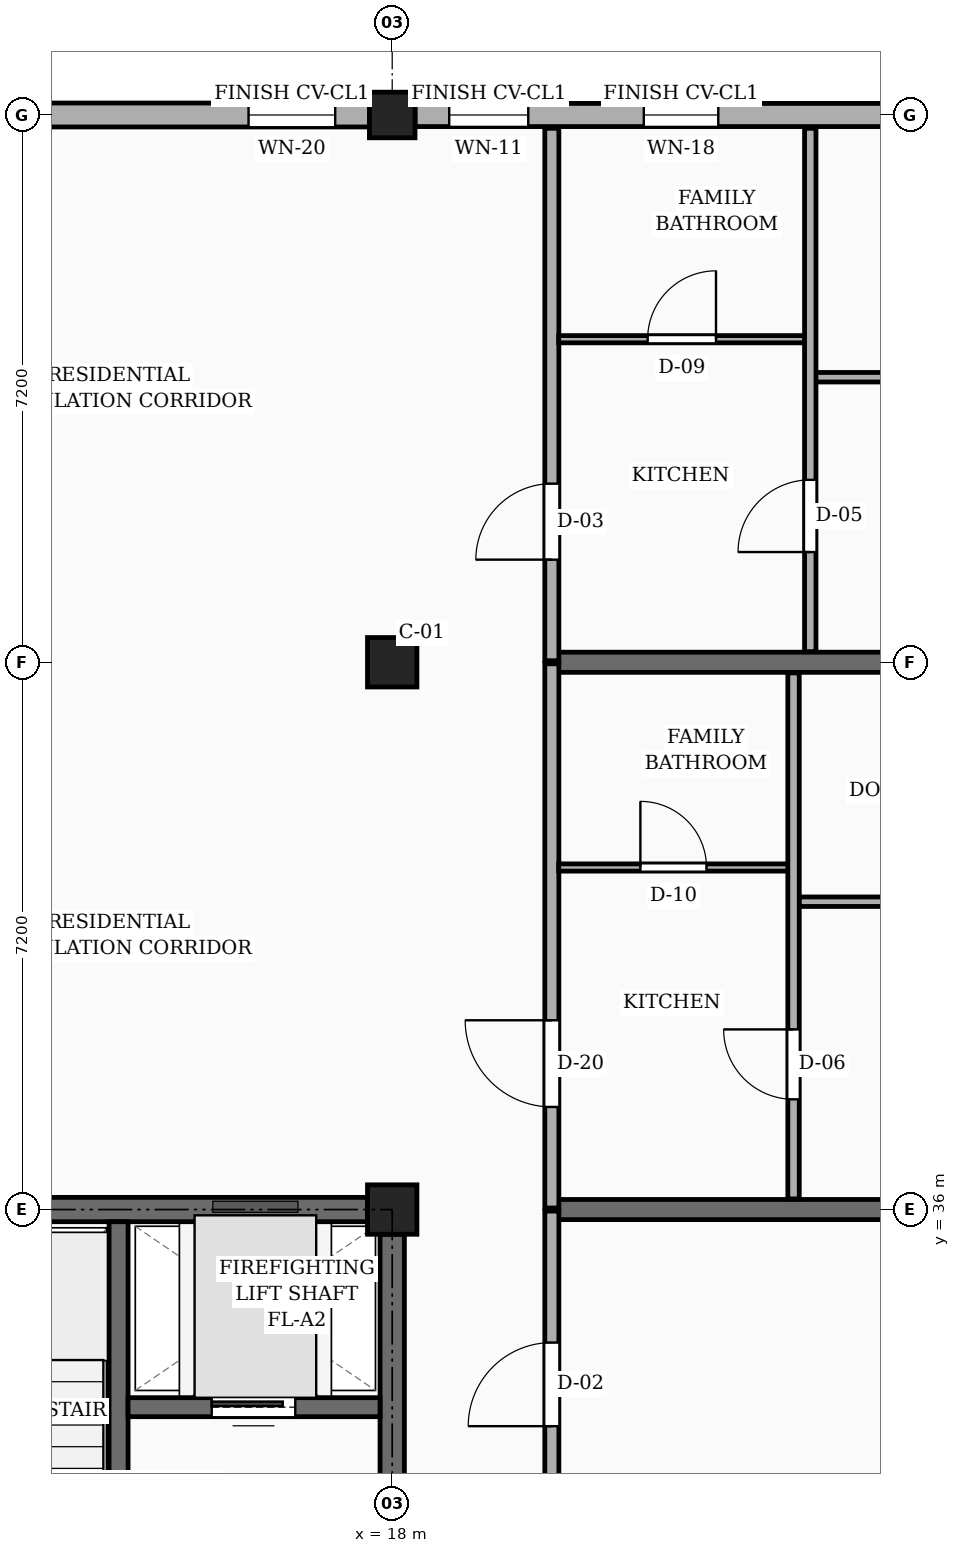
"""IFC4 building model, lengths in metres.
Left out: names, types, materials, properties, quantities, classifications, styles, units other than length and angle.
Written with IfcOpenShell. Run it as: python <this file> out.ifc"""

import sys

from ifc_helpers import new_model, si_unit, direction, frame, frame_2d, origin, origin_2d, place, context, subcontext, project, spatial, rectangle, extrude, element, fill, save


model = new_model("IFC4")
c1 = context("Model", 3, precision=1e-05, world=origin(), true_north=direction((0.0, 1.0)))
c2 = subcontext(c1, "Body", "Model", "MODEL_VIEW")
j1 = project(units=[si_unit("LENGTHUNIT", "METRE"), si_unit("PLANEANGLEUNIT", "RADIAN")], contexts=[c1])
p1 = place(None, origin())
s1 = spatial("IfcSite", under=j1, at=p1, CompositionType="ELEMENT")
p2 = place(p1, origin())
s2 = spatial("IfcBuilding", under=s1, at=p2, CompositionType="ELEMENT")
p3 = place(p2, origin())
s3 = spatial("IfcBuildingStorey", under=s2, at=p3, CompositionType="ELEMENT", Elevation=0.0)
for number, where, z_axis, x_axis in (
    (1, (18.0, 36.0, 0.0), (0.0, 0.0, 1.0), (1.0, 0.0, 0.0)),
    (2, (18.0, 43.2, 0.0), (0.0, 0.0, 1.0), (1.0, 0.0, 0.0)),
):
    element("IfcColumn", number, at=place(p3, frame(where, z_axis=z_axis, x_axis=x_axis)), inside=s3, PredefinedType="COLUMN", context=c2, shape_type="SweptSolid", body=[
        extrude(rectangle(XDim=0.65, YDim=0.65, at=origin_2d()), origin(), (0.0, 0.0, 1.0), 4.5),
    ])
p4 = place(p3, frame((18.0, 50.4, 0.0), z_axis=(0.0, 0.0, 1.0), x_axis=(1.0, 0.0, 0.0)))
e3 = element("IfcColumn", 3, at=p4, inside=s3, PredefinedType="COLUMN", context=c2, shape_type="SweptSolid", body=[
    extrude(rectangle(XDim=0.6, YDim=0.6, at=origin_2d()), origin(), (0.0, 0.0, 1.0), 4.5),
])
for number, where, z_axis, x_axis in (
    (4, (20.1, 36.0, 0.0), (0.0, 0.0, 1.0), (1.0, 0.0, 0.0)),
    (5, (20.1, 43.2, 0.0), (0.0, 0.0, 1.0), (1.0, 0.0, 0.0)),
):
    element("IfcWall", number, at=place(p3, frame(where, z_axis=z_axis, x_axis=x_axis)), inside=s3, PredefinedType="SOLIDWALL", context=c2, shape_type="SweptSolid", body=[
        extrude(rectangle(XDim=12.0, YDim=0.265, at=frame_2d((6.0, 0.0))), origin(), (0.0, 0.0, 1.0), 3.52),
    ])
p5 = place(p3, frame((24.9, 50.4, 0.0), z_axis=(0.0, 0.0, 1.0), x_axis=(-1.0, 0.0, 0.0)))
e6 = element("IfcWall", 6, at=p5, inside=s3, PredefinedType="SOLIDWALL", context=c2, shape_type="SweptSolid", body=[
    extrude(rectangle(XDim=6.6, YDim=0.305, at=frame_2d((3.3, 0.0))), origin(), (0.0, 0.0, 1.0), 3.79),
])
p6 = place(p5, frame((2.61, 0.0, 0.78)))
e7 = element("IfcOpeningElement", 7, at=p6, cuts=e6, PredefinedType="OPENING", context=c2, shape_type="SweptSolid", body=[
    extrude(rectangle(XDim=0.98, YDim=1.36, at=frame_2d((0.49, 0.68))), frame((0.0, 0.163, 0.0), z_axis=(0.0, -1.0, 0.0), x_axis=(1.0, 0.0, 0.0)), (0.0, 0.0, 1.0), 0.325),
])
p7 = place(p5, frame((5.11, 0.0, 0.78)))
e8 = element("IfcOpeningElement", 8, at=p7, cuts=e6, PredefinedType="OPENING", context=c2, shape_type="SweptSolid", body=[
    extrude(rectangle(XDim=1.04, YDim=1.26, at=frame_2d((0.52, 0.63))), frame((0.0, 0.163, 0.0), z_axis=(0.0, -1.0, 0.0), x_axis=(1.0, 0.0, 0.0)), (0.0, 0.0, 1.0), 0.325),
])
p8 = place(p3, frame((17.7, 50.4, 0.0), z_axis=(0.0, 0.0, 1.0), x_axis=(-1.0, 0.0, 0.0)))
e9 = element("IfcWall", 9, at=p8, inside=s3, PredefinedType="SOLIDWALL", context=c2, shape_type="SweptSolid", body=[
    extrude(rectangle(XDim=6.6, YDim=0.315, at=frame_2d((3.3, 0.0))), origin(), (0.0, 0.0, 1.0), 3.79),
])
p9 = place(p8, frame((0.45, 0.0, 0.78)))
e10 = element("IfcOpeningElement", 10, at=p9, cuts=e9, PredefinedType="OPENING", context=c2, shape_type="SweptSolid", body=[
    extrude(rectangle(XDim=1.14, YDim=1.36, at=frame_2d((0.57, 0.68))), frame((0.0, 0.167, 0.0), z_axis=(0.0, -1.0, 0.0), x_axis=(1.0, 0.0, 0.0)), (0.0, 0.0, 1.0), 0.335),
])
p10 = place(p8, frame((4.65, 0.0, 0.78)))
e11 = element("IfcOpeningElement", 11, at=p10, cuts=e9, PredefinedType="OPENING", context=c2, shape_type="SweptSolid", body=[
    extrude(rectangle(XDim=1.3, YDim=1.36, at=frame_2d((0.65, 0.68))), frame((0.0, 0.167, 0.0), z_axis=(0.0, -1.0, 0.0), x_axis=(1.0, 0.0, 0.0)), (0.0, 0.0, 1.0), 0.335),
])
p11 = place(p3, frame((11.125, 36.0, 0.0), z_axis=(0.0, 0.0, 1.0), x_axis=(1.0, 0.0, 0.0)))
e12 = element("IfcWall", 12, at=p11, inside=s3, PredefinedType="SHEAR", context=c2, shape_type="SweptSolid", body=[
    extrude(rectangle(XDim=6.55, YDim=0.32, at=frame_2d((3.275, 0.0))), origin(), (0.0, 0.0, 1.0), 4.22),
])
p12 = place(p3, frame((18.0, 29.125, 0.0), z_axis=(0.0, 0.0, 1.0), x_axis=(0.0, 1.0, 0.0)))
e13 = element("IfcWall", 13, at=p12, inside=s3, PredefinedType="SHEAR", context=c2, shape_type="SweptSolid", body=[
    extrude(rectangle(XDim=6.55, YDim=0.32, at=frame_2d((3.275, 0.0))), origin(), (0.0, 0.0, 1.0), 4.22),
])
p13 = place(p12, frame((1.5, 0.0, 0.0)))
e14 = element("IfcOpeningElement", 14, at=p13, cuts=e13, PredefinedType="OPENING", context=c2, shape_type="SweptSolid", body=[
    extrude(rectangle(XDim=1.1, YDim=2.15, at=frame_2d((0.55, 1.075))), frame((0.0, 0.17, 0.0), z_axis=(0.0, -1.0, 0.0), x_axis=(1.0, 0.0, 0.0)), (0.0, 0.0, 1.0), 0.34),
])
p14 = place(p3, frame((14.4, 28.96, 0.0), z_axis=(0.0, 0.0, 1.0), x_axis=(0.0, 1.0, 0.0)))
e15 = element("IfcWall", 15, at=p14, inside=s3, PredefinedType="SHEAR", context=c2, shape_type="SweptSolid", body=[
    extrude(rectangle(XDim=6.88, YDim=0.25, at=frame_2d((3.44, 0.0))), origin(), (0.0, 0.0, 1.0), 4.22),
])
p15 = place(p14, frame((0.44, 0.0, 0.0)))
e16 = element("IfcOpeningElement", 16, at=p15, cuts=e15, PredefinedType="OPENING", context=c2, shape_type="SweptSolid", body=[
    extrude(rectangle(XDim=1.05, YDim=2.15, at=frame_2d((0.525, 1.075))), frame((0.0, 0.135, 0.0), z_axis=(0.0, -1.0, 0.0), x_axis=(1.0, 0.0, 0.0)), (0.0, 0.0, 1.0), 0.27),
])
p16 = place(p3, frame((14.525, 33.4, 0.0), z_axis=(0.0, 0.0, 1.0), x_axis=(1.0, 0.0, 0.0)))
e17 = element("IfcWall", 17, at=p16, inside=s3, PredefinedType="SHEAR", context=c2, shape_type="SweptSolid", body=[
    extrude(rectangle(XDim=3.315, YDim=0.25, at=frame_2d((1.658, 0.0))), origin(), (0.0, 0.0, 1.0), 4.22),
])
p17 = place(p16, frame((1.1, 0.0, 0.0)))
e18 = element("IfcOpeningElement", 18, at=p17, cuts=e17, PredefinedType="OPENING", context=c2, shape_type="SweptSolid", body=[
    extrude(rectangle(XDim=1.1, YDim=2.2, at=frame_2d((0.55, 1.1))), frame((0.0, 0.135, 0.0), z_axis=(0.0, -1.0, 0.0), x_axis=(1.0, 0.0, 0.0)), (0.0, 0.0, 1.0), 0.27),
])
p18 = place(p3, frame((20.1, 28.82, 0.0), z_axis=(0.0, 0.0, 1.0), x_axis=(0.0, 1.0, 0.0)))
e19 = element("IfcWall", 19, at=p18, inside=s3, PredefinedType="PARTITIONING", context=c2, shape_type="SweptSolid", body=[
    extrude(rectangle(XDim=7.16, YDim=0.185, at=frame_2d((3.58, 0.0))), origin(), (0.0, 0.0, 1.0), 3.655),
])
p19 = place(p18, frame((4.33, 0.0, 0.0)))
e20 = element("IfcOpeningElement", 20, at=p19, cuts=e19, PredefinedType="OPENING", context=c2, shape_type="SweptSolid", body=[
    extrude(rectangle(XDim=1.1, YDim=2.15, at=frame_2d((0.55, 1.075))), frame((0.0, 0.103, 0.0), z_axis=(0.0, -1.0, 0.0), x_axis=(1.0, 0.0, 0.0)), (0.0, 0.0, 1.0), 0.205),
])
p20 = place(p3, frame((20.1, 36.02, 0.0), z_axis=(0.0, 0.0, 1.0), x_axis=(0.0, 1.0, 0.0)))
e21 = element("IfcWall", 21, at=p20, inside=s3, PredefinedType="PARTITIONING", context=c2, shape_type="SweptSolid", body=[
    extrude(rectangle(XDim=7.16, YDim=0.185, at=frame_2d((3.58, 0.0))), origin(), (0.0, 0.0, 1.0), 3.655),
])
p21 = place(p20, frame((1.33, 0.0, 0.0)))
e22 = element("IfcOpeningElement", 22, at=p21, cuts=e21, PredefinedType="OPENING", context=c2, shape_type="SweptSolid", body=[
    extrude(rectangle(XDim=1.14, YDim=2.18, at=frame_2d((0.57, 1.09))), frame((0.0, 0.103, 0.0), z_axis=(0.0, -1.0, 0.0), x_axis=(1.0, 0.0, 0.0)), (0.0, 0.0, 1.0), 0.205),
])
p22 = place(p3, frame((20.1, 43.22, 0.0), z_axis=(0.0, 0.0, 1.0), x_axis=(0.0, 1.0, 0.0)))
e23 = element("IfcWall", 23, at=p22, inside=s3, PredefinedType="PARTITIONING", context=c2, shape_type="SweptSolid", body=[
    extrude(rectangle(XDim=7.005, YDim=0.185, at=frame_2d((3.502, 0.0))), origin(), (0.0, 0.0, 1.0), 3.655),
])
p23 = place(p22, frame((1.33, 0.0, 0.0)))
e24 = element("IfcOpeningElement", 24, at=p23, cuts=e23, PredefinedType="OPENING", context=c2, shape_type="SweptSolid", body=[
    extrude(rectangle(XDim=1.0, YDim=2.15, at=frame_2d((0.5, 1.075))), frame((0.0, 0.103, 0.0), z_axis=(0.0, -1.0, 0.0), x_axis=(1.0, 0.0, 0.0)), (0.0, 0.0, 1.0), 0.205),
])
p24 = place(p3, frame((23.35, 40.05, 0.0), z_axis=(0.0, 0.0, 1.0), x_axis=(1.0, 0.0, 0.0)))
e25 = element("IfcWall", 25, at=p24, inside=s3, PredefinedType="PARTITIONING", context=c2, shape_type="SweptSolid", body=[
    extrude(rectangle(XDim=8.875, YDim=0.125, at=frame_2d((4.438, 0.0))), origin(), (0.0, 0.0, 1.0), 3.655),
])
p25 = place(p24, frame((3.998, 0.0, 0.0)))
e26 = element("IfcOpeningElement", 26, at=p25, cuts=e25, PredefinedType="OPENING", context=c2, shape_type="SweptSolid", body=[
    extrude(rectangle(XDim=0.88, YDim=2.08, at=frame_2d((0.44, 1.04))), frame((0.0, 0.073, 0.0), z_axis=(0.0, -1.0, 0.0), x_axis=(1.0, 0.0, 0.0)), (0.0, 0.0, 1.0), 0.145),
])
p26 = place(p3, frame((20.19, 40.5, 0.0), z_axis=(0.0, 0.0, 1.0), x_axis=(1.0, 0.0, 0.0)))
e27 = element("IfcWall", 27, at=p26, inside=s3, PredefinedType="PARTITIONING", context=c2, shape_type="SweptSolid", body=[
    extrude(rectangle(XDim=3.02, YDim=0.095, at=frame_2d((1.51, 0.0))), origin(), (0.0, 0.0, 1.0), 3.655),
])
p27 = place(p26, frame((1.075, 0.0, 0.0)))
e28 = element("IfcOpeningElement", 28, at=p27, cuts=e27, PredefinedType="OPENING", context=c2, shape_type="SweptSolid", body=[
    extrude(rectangle(XDim=0.87, YDim=2.05, at=frame_2d((0.435, 1.025))), frame((0.0, 0.058, 0.0), z_axis=(0.0, -1.0, 0.0), x_axis=(1.0, 0.0, 0.0)), (0.0, 0.0, 1.0), 0.115),
])
p28 = place(p3, frame((23.28, 36.14, 0.0), z_axis=(0.0, 0.0, 1.0), x_axis=(0.0, 1.0, 0.0)))
e29 = element("IfcWall", 29, at=p28, inside=s3, PredefinedType="PARTITIONING", context=c2, shape_type="SweptSolid", body=[
    extrude(rectangle(XDim=6.92, YDim=0.15, at=frame_2d((3.46, 0.0))), origin(), (0.0, 0.0, 1.0), 3.655),
])
p29 = place(p28, frame((1.31, 0.0, 0.0)))
e30 = element("IfcOpeningElement", 30, at=p29, cuts=e29, PredefinedType="OPENING", context=c2, shape_type="SweptSolid", body=[
    extrude(rectangle(XDim=0.92, YDim=2.1, at=frame_2d((0.46, 1.05))), frame((0.0, 0.085, 0.0), z_axis=(0.0, -1.0, 0.0), x_axis=(1.0, 0.0, 0.0)), (0.0, 0.0, 1.0), 0.17),
])
p30 = place(p3, frame((23.57, 46.95, 0.0), z_axis=(0.0, 0.0, 1.0), x_axis=(1.0, 0.0, 0.0)))
e31 = element("IfcWall", 31, at=p30, inside=s3, PredefinedType="PARTITIONING", context=c2, shape_type="SweptSolid", body=[
    extrude(rectangle(XDim=8.655, YDim=0.125, at=frame_2d((4.328, 0.0))), origin(), (0.0, 0.0, 1.0), 3.655),
])
p31 = place(p30, frame((3.877, 0.0, 0.0)))
e32 = element("IfcOpeningElement", 32, at=p31, cuts=e31, PredefinedType="OPENING", context=c2, shape_type="SweptSolid", body=[
    extrude(rectangle(XDim=0.9, YDim=2.1, at=frame_2d((0.45, 1.05))), frame((0.0, 0.073, 0.0), z_axis=(0.0, -1.0, 0.0), x_axis=(1.0, 0.0, 0.0)), (0.0, 0.0, 1.0), 0.145),
])
p32 = place(p3, frame((20.19, 47.45, 0.0), z_axis=(0.0, 0.0, 1.0), x_axis=(1.0, 0.0, 0.0)))
e33 = element("IfcWall", 33, at=p32, inside=s3, PredefinedType="PARTITIONING", context=c2, shape_type="SweptSolid", body=[
    extrude(rectangle(XDim=3.24, YDim=0.095, at=frame_2d((1.62, 0.0))), origin(), (0.0, 0.0, 1.0), 3.655),
])
p33 = place(p32, frame((1.17, 0.0, 0.0)))
e34 = element("IfcOpeningElement", 34, at=p33, cuts=e33, PredefinedType="OPENING", context=c2, shape_type="SweptSolid", body=[
    extrude(rectangle(XDim=0.9, YDim=2.05, at=frame_2d((0.45, 1.025))), frame((0.0, 0.058, 0.0), z_axis=(0.0, -1.0, 0.0), x_axis=(1.0, 0.0, 0.0)), (0.0, 0.0, 1.0), 0.115),
])
p34 = place(p3, frame((23.5, 43.34, 0.0), z_axis=(0.0, 0.0, 1.0), x_axis=(0.0, 1.0, 0.0)))
e35 = element("IfcWall", 35, at=p34, inside=s3, PredefinedType="PARTITIONING", context=c2, shape_type="SweptSolid", body=[
    extrude(rectangle(XDim=6.885, YDim=0.15, at=frame_2d((3.442, 0.0))), origin(), (0.0, 0.0, 1.0), 3.655),
])
p35 = place(p34, frame((1.31, 0.0, 0.0)))
e36 = element("IfcOpeningElement", 36, at=p35, cuts=e35, PredefinedType="OPENING", context=c2, shape_type="SweptSolid", body=[
    extrude(rectangle(XDim=0.95, YDim=2.1, at=frame_2d((0.475, 1.05))), frame((0.0, 0.085, 0.0), z_axis=(0.0, -1.0, 0.0), x_axis=(1.0, 0.0, 0.0)), (0.0, 0.0, 1.0), 0.17),
])
p36 = place(p6, origin())
e37 = element("IfcWindow", 37, at=p36, inside=s3, PartitioningType="SINGLE_PANEL", PredefinedType="WINDOW", context=c2, shape_type="SweptSolid", body=[
    extrude(rectangle(XDim=0.98, YDim=1.36, at=frame_2d((0.49, 0.68))), frame((0.0, 0.03, 0.0), z_axis=(0.0, -1.0, 0.0), x_axis=(1.0, 0.0, 0.0)), (0.0, 0.0, 1.0), 0.06),
])
fill(e7, e37)
p37 = place(p7, origin())
e38 = element("IfcWindow", 38, at=p37, inside=s3, PartitioningType="SINGLE_PANEL", PredefinedType="WINDOW", context=c2, shape_type="SweptSolid", body=[
    extrude(rectangle(XDim=1.04, YDim=1.26, at=frame_2d((0.52, 0.63))), frame((0.0, 0.03, 0.0), z_axis=(0.0, -1.0, 0.0), x_axis=(1.0, 0.0, 0.0)), (0.0, 0.0, 1.0), 0.06),
])
fill(e8, e38)
p38 = place(p9, origin())
e39 = element("IfcWindow", 39, at=p38, inside=s3, PartitioningType="SINGLE_PANEL", PredefinedType="WINDOW", context=c2, shape_type="SweptSolid", body=[
    extrude(rectangle(XDim=1.14, YDim=1.36, at=frame_2d((0.57, 0.68))), frame((0.0, 0.03, 0.0), z_axis=(0.0, -1.0, 0.0), x_axis=(1.0, 0.0, 0.0)), (0.0, 0.0, 1.0), 0.06),
])
fill(e10, e39)
p39 = place(p17, origin())
e40 = element("IfcDoor", 40, at=p39, inside=s3, OperationType="SLIDING_TO_LEFT", PredefinedType="DOOR", context=c2, shape_type="SweptSolid", body=[
    extrude(rectangle(XDim=1.1, YDim=2.2, at=frame_2d((0.55, 1.1))), frame((0.0, 0.025, 0.0), z_axis=(0.0, -1.0, 0.0), x_axis=(1.0, 0.0, 0.0)), (0.0, 0.0, 1.0), 0.05),
])
fill(e18, e40)
p40 = place(p19, origin())
e41 = element("IfcDoor", 41, at=p40, inside=s3, OperationType="SINGLE_SWING_LEFT", PredefinedType="DOOR", context=c2, shape_type="SweptSolid", body=[
    extrude(rectangle(XDim=1.1, YDim=2.15, at=frame_2d((0.55, 1.075))), frame((0.0, 0.025, 0.0), z_axis=(0.0, -1.0, 0.0), x_axis=(1.0, 0.0, 0.0)), (0.0, 0.0, 1.0), 0.05),
])
fill(e20, e41)
p41 = place(p21, origin())
e42 = element("IfcDoor", 42, at=p41, inside=s3, OperationType="SINGLE_SWING_RIGHT", PredefinedType="DOOR", context=c2, shape_type="SweptSolid", body=[
    extrude(rectangle(XDim=1.14, YDim=2.18, at=frame_2d((0.57, 1.09))), frame((0.0, 0.025, 0.0), z_axis=(0.0, -1.0, 0.0), x_axis=(1.0, 0.0, 0.0)), (0.0, 0.0, 1.0), 0.05),
])
fill(e22, e42)
p42 = place(p23, origin())
e43 = element("IfcDoor", 43, at=p42, inside=s3, OperationType="SINGLE_SWING_LEFT", PredefinedType="DOOR", context=c2, shape_type="SweptSolid", body=[
    extrude(rectangle(XDim=1.0, YDim=2.15, at=frame_2d((0.5, 1.075))), frame((0.0, 0.025, 0.0), z_axis=(0.0, -1.0, 0.0), x_axis=(1.0, 0.0, 0.0)), (0.0, 0.0, 1.0), 0.05),
])
fill(e24, e43)
p43 = place(p27, origin())
e44 = element("IfcDoor", 44, at=p43, inside=s3, OperationType="SINGLE_SWING_LEFT", PredefinedType="DOOR", context=c2, shape_type="SweptSolid", body=[
    extrude(rectangle(XDim=0.87, YDim=2.05, at=frame_2d((0.435, 1.025))), frame((0.0, 0.025, 0.0), z_axis=(0.0, -1.0, 0.0), x_axis=(1.0, 0.0, 0.0)), (0.0, 0.0, 1.0), 0.05),
])
fill(e28, e44)
p44 = place(p29, origin())
e45 = element("IfcDoor", 45, at=p44, inside=s3, OperationType="SINGLE_SWING_RIGHT", PredefinedType="DOOR", context=c2, shape_type="SweptSolid", body=[
    extrude(rectangle(XDim=0.92, YDim=2.1, at=frame_2d((0.46, 1.05))), frame((0.0, 0.025, 0.0), z_axis=(0.0, -1.0, 0.0), x_axis=(1.0, 0.0, 0.0)), (0.0, 0.0, 1.0), 0.05),
])
fill(e30, e45)
p45 = place(p33, origin())
e46 = element("IfcDoor", 46, at=p45, inside=s3, OperationType="SINGLE_SWING_RIGHT", PredefinedType="DOOR", context=c2, shape_type="SweptSolid", body=[
    extrude(rectangle(XDim=0.9, YDim=2.05, at=frame_2d((0.45, 1.025))), frame((0.0, 0.025, 0.0), z_axis=(0.0, -1.0, 0.0), x_axis=(1.0, 0.0, 0.0)), (0.0, 0.0, 1.0), 0.05),
])
fill(e34, e46)
p46 = place(p35, origin())
e47 = element("IfcDoor", 47, at=p46, inside=s3, OperationType="SINGLE_SWING_LEFT", PredefinedType="DOOR", context=c2, shape_type="SweptSolid", body=[
    extrude(rectangle(XDim=0.95, YDim=2.1, at=frame_2d((0.475, 1.05))), frame((0.0, 0.025, 0.0), z_axis=(0.0, -1.0, 0.0), x_axis=(1.0, 0.0, 0.0)), (0.0, 0.0, 1.0), 0.05),
])
fill(e36, e47)
save(model, sys.argv[1])
